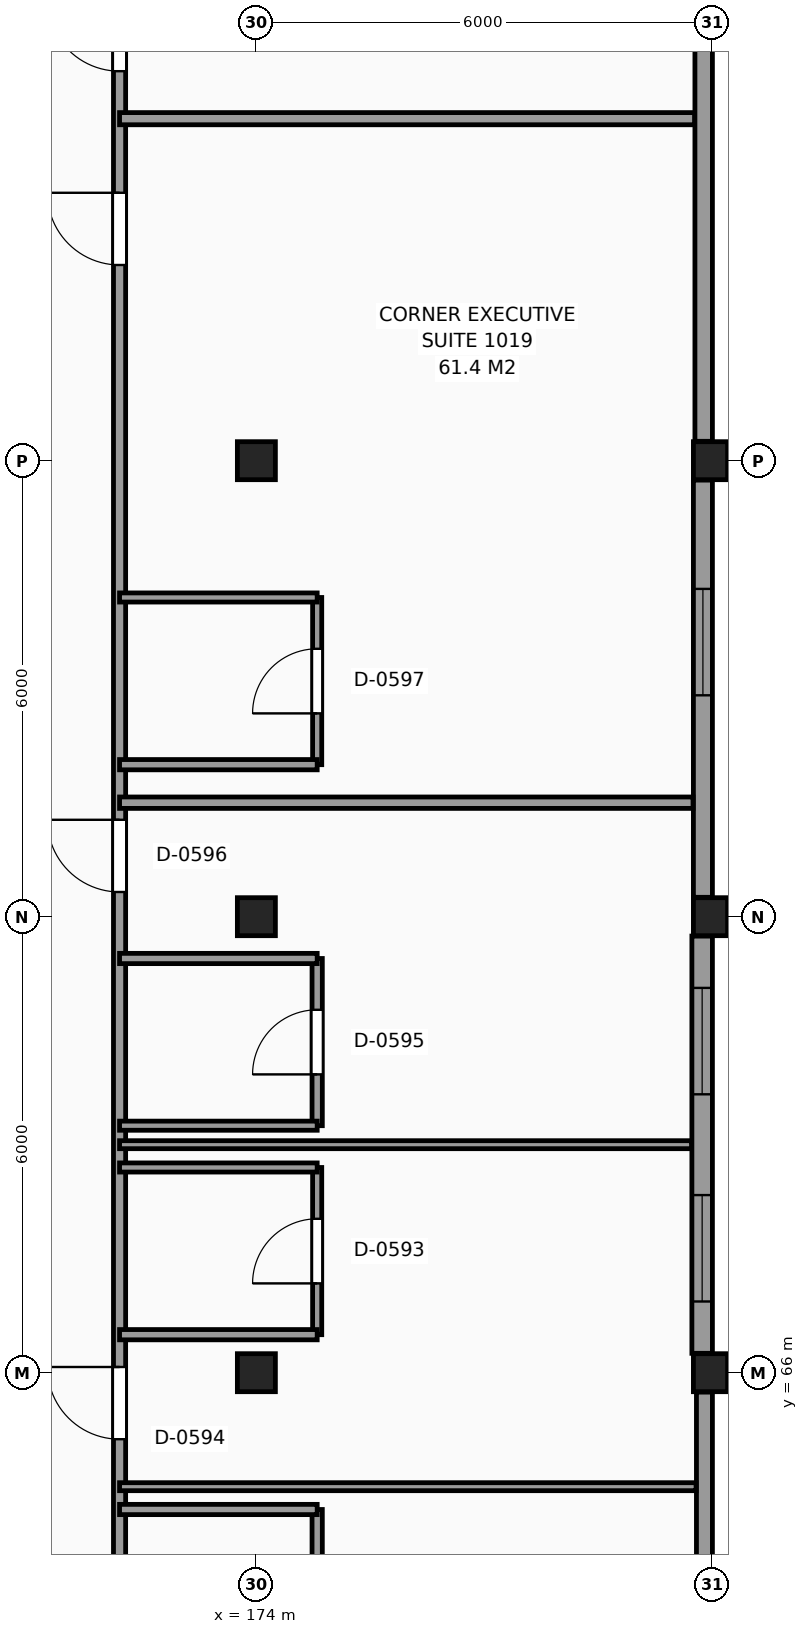
"""IFC4 building model, lengths in metres.
Left out: names, types, materials, properties, quantities, classifications, styles, units other than length and angle.
Written with IfcOpenShell. Run it as: python <this file> out.ifc"""

import sys

from ifc_helpers import new_model, si_unit, direction, frame, frame_2d, origin, origin_2d, place, context, subcontext, project, spatial, rectangle, extrude, element, fill, save


model = new_model("IFC4")
c1 = context("Model", 3, precision=1e-05, world=origin(), true_north=direction((0.0, 1.0)))
c2 = subcontext(c1, "Body", "Model", "MODEL_VIEW")
j1 = project(units=[si_unit("LENGTHUNIT", "METRE"), si_unit("PLANEANGLEUNIT", "RADIAN")], contexts=[c1])
p1 = place(None, origin())
s1 = spatial("IfcSite", under=j1, at=p1, CompositionType="ELEMENT")
p2 = place(p1, origin())
s2 = spatial("IfcBuilding", under=s1, at=p2, CompositionType="ELEMENT")
p3 = place(p2, frame((0.0, 0.0, 41.4)))
s3 = spatial("IfcBuildingStorey", under=s2, at=p3, CompositionType="ELEMENT", Elevation=41.4)
for number, where, z_axis, x_axis in (
    (1, (174.0, 66.0, 0.0), (0.0, 0.0, 1.0), (1.0, 0.0, 0.0)),
    (2, (174.0, 72.0, 0.0), (0.0, 0.0, 1.0), (1.0, 0.0, 0.0)),
    (3, (174.0, 78.0, 0.0), (0.0, 0.0, 1.0), (1.0, 0.0, 0.0)),
    (4, (180.0, 66.0, 0.0), (0.0, 0.0, 1.0), (1.0, 0.0, 0.0)),
    (5, (180.0, 72.0, 0.0), (0.0, 0.0, 1.0), (1.0, 0.0, 0.0)),
    (6, (180.0, 78.0, 0.0), (0.0, 0.0, 1.0), (1.0, 0.0, 0.0)),
):
    element("IfcColumn", number, at=place(p3, frame(where, z_axis=z_axis, x_axis=x_axis)), inside=s3, PredefinedType="COLUMN", context=c2, shape_type="SweptSolid", body=[
        extrude(rectangle(XDim=0.5, YDim=0.5, at=origin_2d()), origin(), (0.0, 0.0, 1.0), 3.3),
    ])
p4 = place(p3, frame((179.895, 60.255, 0.0), z_axis=(0.0, 0.0, 1.0), x_axis=(0.0, 1.0, 0.0)))
e7 = element("IfcWall", 7, at=p4, inside=s3, PredefinedType="SOLIDWALL", context=c2, shape_type="SweptSolid", body=[
    extrude(rectangle(XDim=5.49, YDim=0.21, at=frame_2d((2.745, 0.0))), origin(), (0.0, 0.0, 1.0), 2.445),
])
p5 = place(p4, frame((1.433, 0.0, 0.8)))
e8 = element("IfcOpeningElement", 8, at=p5, cuts=e7, PredefinedType="OPENING", context=c2, shape_type="SweptSolid", body=[
    extrude(rectangle(XDim=1.4, YDim=1.4, at=frame_2d((0.7, 0.7))), frame((0.0, 0.115, 0.0), z_axis=(0.0, -1.0, 0.0), x_axis=(1.0, 0.0, 0.0)), (0.0, 0.0, 1.0), 0.23),
])
p6 = place(p3, frame((179.865, 66.255, 0.0), z_axis=(0.0, 0.0, 1.0), x_axis=(0.0, 1.0, 0.0)))
e9 = element("IfcWall", 9, at=p6, inside=s3, PredefinedType="SOLIDWALL", context=c2, shape_type="SweptSolid", body=[
    extrude(rectangle(XDim=5.49, YDim=0.27, at=frame_2d((2.745, 0.0))), origin(), (0.0, 0.0, 1.0), 2.41),
])
p7 = place(p6, frame((0.682, 0.0, 0.8)))
e10 = element("IfcOpeningElement", 10, at=p7, cuts=e9, PredefinedType="OPENING", context=c2, shape_type="SweptSolid", body=[
    extrude(rectangle(XDim=1.4, YDim=1.4, at=frame_2d((0.7, 0.7))), frame((0.0, 0.145, 0.0), z_axis=(0.0, -1.0, 0.0), x_axis=(1.0, 0.0, 0.0)), (0.0, 0.0, 1.0), 0.29),
])
p8 = place(p6, frame((3.408, 0.0, 0.8)))
e11 = element("IfcOpeningElement", 11, at=p8, cuts=e9, PredefinedType="OPENING", context=c2, shape_type="SweptSolid", body=[
    extrude(rectangle(XDim=1.4, YDim=1.4, at=frame_2d((0.7, 0.7))), frame((0.0, 0.145, 0.0), z_axis=(0.0, -1.0, 0.0), x_axis=(1.0, 0.0, 0.0)), (0.0, 0.0, 1.0), 0.29),
])
p9 = place(p3, frame((179.875, 72.255, 0.0), z_axis=(0.0, 0.0, 1.0), x_axis=(0.0, 1.0, 0.0)))
e12 = element("IfcWall", 12, at=p9, inside=s3, PredefinedType="SOLIDWALL", context=c2, shape_type="SweptSolid", body=[
    extrude(rectangle(XDim=5.49, YDim=0.25, at=frame_2d((2.745, 0.0))), origin(), (0.0, 0.0, 1.0), 2.41),
])
p10 = place(p9, frame((2.658, 0.0, 0.8)))
e13 = element("IfcOpeningElement", 13, at=p10, cuts=e12, PredefinedType="OPENING", context=c2, shape_type="SweptSolid", body=[
    extrude(rectangle(XDim=1.4, YDim=1.4, at=frame_2d((0.7, 0.7))), frame((0.0, 0.135, 0.0), z_axis=(0.0, -1.0, 0.0), x_axis=(1.0, 0.0, 0.0)), (0.0, 0.0, 1.0), 0.27),
])
p11 = place(p3, frame((179.885, 78.255, 0.0), z_axis=(0.0, 0.0, 1.0), x_axis=(0.0, 1.0, 0.0)))
e14 = element("IfcWall", 14, at=p11, inside=s3, PredefinedType="SOLIDWALL", context=c2, shape_type="SweptSolid", body=[
    extrude(rectangle(XDim=5.49, YDim=0.23, at=frame_2d((2.745, 0.0))), origin(), (0.0, 0.0, 1.0), 2.41),
])
p12 = place(p3, frame((172.2, 42.275, 0.0), z_axis=(0.0, 0.0, 1.0), x_axis=(0.0, 1.0, 0.0)))
e15 = element("IfcWall", 15, at=p12, inside=s3, PredefinedType="PARTITIONING", context=c2, shape_type="SweptSolid", body=[
    extrude(rectangle(XDim=65.545, YDim=0.16, at=frame_2d((32.772, 0.0))), origin(), (0.0, 0.0, 1.0), 3.06),
])
p13 = place(p12, frame((0.4, 0.0, 0.0)))
e16 = element("IfcOpeningElement", 16, at=p13, cuts=e15, PredefinedType="OPENING", context=c2, shape_type="SweptSolid", body=[
    extrude(rectangle(XDim=0.95, YDim=2.1, at=frame_2d((0.475, 1.05))), frame((0.0, 0.09, 0.0), z_axis=(0.0, -1.0, 0.0), x_axis=(1.0, 0.0, 0.0)), (0.0, 0.0, 1.0), 0.18),
])
p14 = place(p12, frame((4.85, 0.0, 0.0)))
e17 = element("IfcOpeningElement", 17, at=p14, cuts=e15, PredefinedType="OPENING", context=c2, shape_type="SweptSolid", body=[
    extrude(rectangle(XDim=0.95, YDim=2.1, at=frame_2d((0.475, 1.05))), frame((0.0, 0.09, 0.0), z_axis=(0.0, -1.0, 0.0), x_axis=(1.0, 0.0, 0.0)), (0.0, 0.0, 1.0), 0.18),
])
p15 = place(p12, frame((9.35, 0.0, 0.0)))
e18 = element("IfcOpeningElement", 18, at=p15, cuts=e15, PredefinedType="OPENING", context=c2, shape_type="SweptSolid", body=[
    extrude(rectangle(XDim=0.95, YDim=2.1, at=frame_2d((0.475, 1.05))), frame((0.0, 0.09, 0.0), z_axis=(0.0, -1.0, 0.0), x_axis=(1.0, 0.0, 0.0)), (0.0, 0.0, 1.0), 0.18),
])
p16 = place(p12, frame((18.45, 0.0, 0.0)))
e19 = element("IfcOpeningElement", 19, at=p16, cuts=e15, PredefinedType="OPENING", context=c2, shape_type="SweptSolid", body=[
    extrude(rectangle(XDim=0.95, YDim=2.1, at=frame_2d((0.475, 1.05))), frame((0.0, 0.09, 0.0), z_axis=(0.0, -1.0, 0.0), x_axis=(1.0, 0.0, 0.0)), (0.0, 0.0, 1.0), 0.18),
])
p17 = place(p12, frame((22.85, 0.0, 0.0)))
e20 = element("IfcOpeningElement", 20, at=p17, cuts=e15, PredefinedType="OPENING", context=c2, shape_type="SweptSolid", body=[
    extrude(rectangle(XDim=0.95, YDim=2.1, at=frame_2d((0.475, 1.05))), frame((0.0, 0.09, 0.0), z_axis=(0.0, -1.0, 0.0), x_axis=(1.0, 0.0, 0.0)), (0.0, 0.0, 1.0), 0.18),
])
p18 = place(p12, frame((30.05, 0.0, 0.0)))
e21 = element("IfcOpeningElement", 21, at=p18, cuts=e15, PredefinedType="OPENING", context=c2, shape_type="SweptSolid", body=[
    extrude(rectangle(XDim=0.95, YDim=2.1, at=frame_2d((0.475, 1.05))), frame((0.0, 0.09, 0.0), z_axis=(0.0, -1.0, 0.0), x_axis=(1.0, 0.0, 0.0)), (0.0, 0.0, 1.0), 0.18),
])
p19 = place(p12, frame((38.3, 0.0, 0.0)))
e22 = element("IfcOpeningElement", 22, at=p19, cuts=e15, PredefinedType="OPENING", context=c2, shape_type="SweptSolid", body=[
    extrude(rectangle(XDim=0.95, YDim=2.1, at=frame_2d((0.475, 1.05))), frame((0.0, 0.09, 0.0), z_axis=(0.0, -1.0, 0.0), x_axis=(1.0, 0.0, 0.0)), (0.0, 0.0, 1.0), 0.18),
])
p20 = place(p12, frame((40.85, 0.0, 0.0)))
e23 = element("IfcOpeningElement", 23, at=p20, cuts=e15, PredefinedType="OPENING", context=c2, shape_type="SweptSolid", body=[
    extrude(rectangle(XDim=0.95, YDim=2.1, at=frame_2d((0.475, 1.05))), frame((0.0, 0.09, 0.0), z_axis=(0.0, -1.0, 0.0), x_axis=(1.0, 0.0, 0.0)), (0.0, 0.0, 1.0), 0.18),
])
p21 = place(p12, frame((48.05, 0.0, 0.0)))
e24 = element("IfcOpeningElement", 24, at=p21, cuts=e15, PredefinedType="OPENING", context=c2, shape_type="SweptSolid", body=[
    extrude(rectangle(XDim=0.95, YDim=2.1, at=frame_2d((0.475, 1.05))), frame((0.0, 0.09, 0.0), z_axis=(0.0, -1.0, 0.0), x_axis=(1.0, 0.0, 0.0)), (0.0, 0.0, 1.0), 0.18),
])
p22 = place(p12, frame((52.25, 0.0, 0.0)))
e25 = element("IfcOpeningElement", 25, at=p22, cuts=e15, PredefinedType="OPENING", context=c2, shape_type="SweptSolid", body=[
    extrude(rectangle(XDim=0.95, YDim=2.1, at=frame_2d((0.475, 1.05))), frame((0.0, 0.09, 0.0), z_axis=(0.0, -1.0, 0.0), x_axis=(1.0, 0.0, 0.0)), (0.0, 0.0, 1.0), 0.18),
])
p23 = place(p12, frame((54.45, 0.0, 0.0)))
e26 = element("IfcOpeningElement", 26, at=p23, cuts=e15, PredefinedType="OPENING", context=c2, shape_type="SweptSolid", body=[
    extrude(rectangle(XDim=0.95, YDim=2.1, at=frame_2d((0.475, 1.05))), frame((0.0, 0.09, 0.0), z_axis=(0.0, -1.0, 0.0), x_axis=(1.0, 0.0, 0.0)), (0.0, 0.0, 1.0), 0.18),
])
p24 = place(p12, frame((60.45, 0.0, 0.0)))
e27 = element("IfcOpeningElement", 27, at=p24, cuts=e15, PredefinedType="OPENING", context=c2, shape_type="SweptSolid", body=[
    extrude(rectangle(XDim=0.95, YDim=2.1, at=frame_2d((0.475, 1.05))), frame((0.0, 0.09, 0.0), z_axis=(0.0, -1.0, 0.0), x_axis=(1.0, 0.0, 0.0)), (0.0, 0.0, 1.0), 0.18),
])
p25 = place(p3, frame((174.8, 62.0, 0.0), z_axis=(0.0, 0.0, 1.0), x_axis=(0.0, 1.0, 0.0)))
e28 = element("IfcWall", 28, at=p25, inside=s3, PredefinedType="PARTITIONING", context=c2, shape_type="SweptSolid", body=[
    extrude(rectangle(XDim=2.2, YDim=0.135, at=frame_2d((1.1, 0.0))), origin(), (0.0, 0.0, 1.0), 3.06),
])
p26 = place(p25, frame((0.675, 0.0, 0.0)))
e29 = element("IfcOpeningElement", 29, at=p26, cuts=e28, PredefinedType="OPENING", context=c2, shape_type="SweptSolid", body=[
    extrude(rectangle(XDim=0.85, YDim=2.1, at=frame_2d((0.425, 1.05))), frame((0.0, 0.078, 0.0), z_axis=(0.0, -1.0, 0.0), x_axis=(1.0, 0.0, 0.0)), (0.0, 0.0, 1.0), 0.155),
])
p27 = place(p3, frame((174.8, 66.5, 0.0), z_axis=(0.0, 0.0, 1.0), x_axis=(0.0, 1.0, 0.0)))
e30 = element("IfcWall", 30, at=p27, inside=s3, PredefinedType="PARTITIONING", context=c2, shape_type="SweptSolid", body=[
    extrude(rectangle(XDim=2.2, YDim=0.12, at=frame_2d((1.1, 0.0))), origin(), (0.0, 0.0, 1.0), 3.06),
])
p28 = place(p27, frame((0.675, 0.0, 0.0)))
e31 = element("IfcOpeningElement", 31, at=p28, cuts=e30, PredefinedType="OPENING", context=c2, shape_type="SweptSolid", body=[
    extrude(rectangle(XDim=0.85, YDim=2.1, at=frame_2d((0.425, 1.05))), frame((0.0, 0.07, 0.0), z_axis=(0.0, -1.0, 0.0), x_axis=(1.0, 0.0, 0.0)), (0.0, 0.0, 1.0), 0.14),
])
p29 = place(p3, frame((174.8, 69.25, 0.0), z_axis=(0.0, 0.0, 1.0), x_axis=(0.0, 1.0, 0.0)))
e32 = element("IfcWall", 32, at=p29, inside=s3, PredefinedType="PARTITIONING", context=c2, shape_type="SweptSolid", body=[
    extrude(rectangle(XDim=2.2, YDim=0.135, at=frame_2d((1.1, 0.0))), origin(), (0.0, 0.0, 1.0), 3.06),
])
p30 = place(p29, frame((0.675, 0.0, 0.0)))
e33 = element("IfcOpeningElement", 33, at=p30, cuts=e32, PredefinedType="OPENING", context=c2, shape_type="SweptSolid", body=[
    extrude(rectangle(XDim=0.85, YDim=2.1, at=frame_2d((0.425, 1.05))), frame((0.0, 0.078, 0.0), z_axis=(0.0, -1.0, 0.0), x_axis=(1.0, 0.0, 0.0)), (0.0, 0.0, 1.0), 0.155),
])
p31 = place(p3, frame((174.8, 74.0, 0.0), z_axis=(0.0, 0.0, 1.0), x_axis=(0.0, 1.0, 0.0)))
e34 = element("IfcWall", 34, at=p31, inside=s3, PredefinedType="PARTITIONING", context=c2, shape_type="SweptSolid", body=[
    extrude(rectangle(XDim=2.2, YDim=0.12, at=frame_2d((1.1, 0.0))), origin(), (0.0, 0.0, 1.0), 3.06),
])
p32 = place(p31, frame((0.675, 0.0, 0.0)))
e35 = element("IfcOpeningElement", 35, at=p32, cuts=e34, PredefinedType="OPENING", context=c2, shape_type="SweptSolid", body=[
    extrude(rectangle(XDim=0.85, YDim=2.1, at=frame_2d((0.425, 1.05))), frame((0.0, 0.07, 0.0), z_axis=(0.0, -1.0, 0.0), x_axis=(1.0, 0.0, 0.0)), (0.0, 0.0, 1.0), 0.14),
])
p33 = place(p3, frame((172.2, 64.2, 0.0), z_axis=(0.0, 0.0, 1.0), x_axis=(1.0, 0.0, 0.0)))
e36 = element("IfcWall", 36, at=p33, inside=s3, PredefinedType="PARTITIONING", context=c2, shape_type="SweptSolid", body=[
    extrude(rectangle(XDim=2.6, YDim=0.135, at=frame_2d((1.3, 0.0))), origin(), (0.0, 0.0, 1.0), 3.06),
])
p34 = place(p3, frame((172.2, 64.5, 0.0), z_axis=(0.0, 0.0, 1.0), x_axis=(1.0, 0.0, 0.0)))
e37 = element("IfcWall", 37, at=p34, inside=s3, PredefinedType="PARTITIONING", context=c2, shape_type="SweptSolid", body=[
    extrude(rectangle(XDim=7.585, YDim=0.105, at=frame_2d((3.792, 0.0))), origin(), (0.0, 0.0, 1.0), 3.06),
])
p35 = place(p3, frame((172.2, 66.5, 0.0), z_axis=(0.0, 0.0, 1.0), x_axis=(1.0, 0.0, 0.0)))
e38 = element("IfcWall", 38, at=p35, inside=s3, PredefinedType="PARTITIONING", context=c2, shape_type="SweptSolid", body=[
    extrude(rectangle(XDim=2.6, YDim=0.135, at=frame_2d((1.3, 0.0))), origin(), (0.0, 0.0, 1.0), 3.06),
])
p36 = place(p3, frame((172.2, 68.7, 0.0), z_axis=(0.0, 0.0, 1.0), x_axis=(1.0, 0.0, 0.0)))
e39 = element("IfcWall", 39, at=p36, inside=s3, PredefinedType="PARTITIONING", context=c2, shape_type="SweptSolid", body=[
    extrude(rectangle(XDim=2.6, YDim=0.12, at=frame_2d((1.3, 0.0))), origin(), (0.0, 0.0, 1.0), 3.06),
])
p37 = place(p3, frame((172.2, 69.0, 0.0), z_axis=(0.0, 0.0, 1.0), x_axis=(1.0, 0.0, 0.0)))
e40 = element("IfcWall", 40, at=p37, inside=s3, PredefinedType="PARTITIONING", context=c2, shape_type="SweptSolid", body=[
    extrude(rectangle(XDim=7.525, YDim=0.105, at=frame_2d((3.763, 0.0))), origin(), (0.0, 0.0, 1.0), 3.06),
])
p38 = place(p3, frame((172.2, 69.25, 0.0), z_axis=(0.0, 0.0, 1.0), x_axis=(1.0, 0.0, 0.0)))
e41 = element("IfcWall", 41, at=p38, inside=s3, PredefinedType="PARTITIONING", context=c2, shape_type="SweptSolid", body=[
    extrude(rectangle(XDim=2.6, YDim=0.12, at=frame_2d((1.3, 0.0))), origin(), (0.0, 0.0, 1.0), 3.06),
])
p39 = place(p3, frame((172.2, 71.45, 0.0), z_axis=(0.0, 0.0, 1.0), x_axis=(1.0, 0.0, 0.0)))
e42 = element("IfcWall", 42, at=p39, inside=s3, PredefinedType="PARTITIONING", context=c2, shape_type="SweptSolid", body=[
    extrude(rectangle(XDim=2.6, YDim=0.135, at=frame_2d((1.3, 0.0))), origin(), (0.0, 0.0, 1.0), 3.06),
])
p40 = place(p3, frame((172.2, 73.5, 0.0), z_axis=(0.0, 0.0, 1.0), x_axis=(1.0, 0.0, 0.0)))
e43 = element("IfcWall", 43, at=p40, inside=s3, PredefinedType="PARTITIONING", context=c2, shape_type="SweptSolid", body=[
    extrude(rectangle(XDim=7.545, YDim=0.15, at=frame_2d((3.772, 0.0))), origin(), (0.0, 0.0, 1.0), 3.06),
])
p41 = place(p3, frame((172.2, 74.0, 0.0), z_axis=(0.0, 0.0, 1.0), x_axis=(1.0, 0.0, 0.0)))
e44 = element("IfcWall", 44, at=p41, inside=s3, PredefinedType="PARTITIONING", context=c2, shape_type="SweptSolid", body=[
    extrude(rectangle(XDim=2.6, YDim=0.135, at=frame_2d((1.3, 0.0))), origin(), (0.0, 0.0, 1.0), 3.06),
])
p42 = place(p3, frame((172.2, 76.2, 0.0), z_axis=(0.0, 0.0, 1.0), x_axis=(1.0, 0.0, 0.0)))
e45 = element("IfcWall", 45, at=p42, inside=s3, PredefinedType="PARTITIONING", context=c2, shape_type="SweptSolid", body=[
    extrude(rectangle(XDim=2.6, YDim=0.12, at=frame_2d((1.3, 0.0))), origin(), (0.0, 0.0, 1.0), 3.06),
])
p43 = place(p3, frame((172.2, 82.5, 0.0), z_axis=(0.0, 0.0, 1.0), x_axis=(1.0, 0.0, 0.0)))
e46 = element("IfcWall", 46, at=p43, inside=s3, PredefinedType="PARTITIONING", context=c2, shape_type="SweptSolid", body=[
    extrude(rectangle(XDim=7.565, YDim=0.16, at=frame_2d((3.782, 0.0))), origin(), (0.0, 0.0, 1.0), 3.06),
])
p44 = place(p7, origin())
e47 = element("IfcWindow", 47, at=p44, inside=s3, PartitioningType="SINGLE_PANEL", PredefinedType="WINDOW", context=c2, shape_type="SweptSolid", body=[
    extrude(rectangle(XDim=1.4, YDim=1.4, at=frame_2d((0.7, 0.7))), frame((0.0, 0.03, 0.0), z_axis=(0.0, -1.0, 0.0), x_axis=(1.0, 0.0, 0.0)), (0.0, 0.0, 1.0), 0.06),
])
fill(e10, e47)
p45 = place(p8, origin())
e48 = element("IfcWindow", 48, at=p45, inside=s3, PartitioningType="SINGLE_PANEL", PredefinedType="WINDOW", context=c2, shape_type="SweptSolid", body=[
    extrude(rectangle(XDim=1.4, YDim=1.4, at=frame_2d((0.7, 0.7))), frame((0.0, 0.03, 0.0), z_axis=(0.0, -1.0, 0.0), x_axis=(1.0, 0.0, 0.0)), (0.0, 0.0, 1.0), 0.06),
])
fill(e11, e48)
p46 = place(p10, origin())
e49 = element("IfcWindow", 49, at=p46, inside=s3, PartitioningType="SINGLE_PANEL", PredefinedType="WINDOW", context=c2, shape_type="SweptSolid", body=[
    extrude(rectangle(XDim=1.4, YDim=1.4, at=frame_2d((0.7, 0.7))), frame((0.0, 0.03, 0.0), z_axis=(0.0, -1.0, 0.0), x_axis=(1.0, 0.0, 0.0)), (0.0, 0.0, 1.0), 0.06),
])
fill(e13, e49)
p47 = place(p28, origin())
e50 = element("IfcDoor", 50, at=p47, inside=s3, OperationType="SINGLE_SWING_LEFT", PredefinedType="DOOR", context=c2, shape_type="SweptSolid", body=[
    extrude(rectangle(XDim=0.85, YDim=2.1, at=frame_2d((0.425, 1.05))), frame((0.0, 0.025, 0.0), z_axis=(0.0, -1.0, 0.0), x_axis=(1.0, 0.0, 0.0)), (0.0, 0.0, 1.0), 0.05),
])
fill(e31, e50)
p48 = place(p17, origin())
e51 = element("IfcDoor", 51, at=p48, inside=s3, OperationType="SINGLE_SWING_RIGHT", PredefinedType="DOOR", context=c2, shape_type="SweptSolid", body=[
    extrude(rectangle(XDim=0.95, YDim=2.1, at=frame_2d((0.475, 1.05))), frame((0.0, 0.025, 0.0), z_axis=(0.0, -1.0, 0.0), x_axis=(1.0, 0.0, 0.0)), (0.0, 0.0, 1.0), 0.05),
])
fill(e20, e51)
p49 = place(p30, origin())
e52 = element("IfcDoor", 52, at=p49, inside=s3, OperationType="SINGLE_SWING_LEFT", PredefinedType="DOOR", context=c2, shape_type="SweptSolid", body=[
    extrude(rectangle(XDim=0.85, YDim=2.1, at=frame_2d((0.425, 1.05))), frame((0.0, 0.025, 0.0), z_axis=(0.0, -1.0, 0.0), x_axis=(1.0, 0.0, 0.0)), (0.0, 0.0, 1.0), 0.05),
])
fill(e33, e52)
p50 = place(p18, origin())
e53 = element("IfcDoor", 53, at=p50, inside=s3, OperationType="SINGLE_SWING_RIGHT", PredefinedType="DOOR", context=c2, shape_type="SweptSolid", body=[
    extrude(rectangle(XDim=0.95, YDim=2.1, at=frame_2d((0.475, 1.05))), frame((0.0, 0.025, 0.0), z_axis=(0.0, -1.0, 0.0), x_axis=(1.0, 0.0, 0.0)), (0.0, 0.0, 1.0), 0.05),
])
fill(e21, e53)
p51 = place(p32, origin())
e54 = element("IfcDoor", 54, at=p51, inside=s3, OperationType="SINGLE_SWING_LEFT", PredefinedType="DOOR", context=c2, shape_type="SweptSolid", body=[
    extrude(rectangle(XDim=0.85, YDim=2.1, at=frame_2d((0.425, 1.05))), frame((0.0, 0.025, 0.0), z_axis=(0.0, -1.0, 0.0), x_axis=(1.0, 0.0, 0.0)), (0.0, 0.0, 1.0), 0.05),
])
fill(e35, e54)
p52 = place(p19, origin())
e55 = element("IfcDoor", 55, at=p52, inside=s3, OperationType="SINGLE_SWING_RIGHT", PredefinedType="DOOR", context=c2, shape_type="SweptSolid", body=[
    extrude(rectangle(XDim=0.95, YDim=2.1, at=frame_2d((0.475, 1.05))), frame((0.0, 0.025, 0.0), z_axis=(0.0, -1.0, 0.0), x_axis=(1.0, 0.0, 0.0)), (0.0, 0.0, 1.0), 0.05),
])
fill(e22, e55)
p53 = place(p20, origin())
e56 = element("IfcDoor", 56, at=p53, inside=s3, OperationType="SINGLE_SWING_RIGHT", PredefinedType="DOOR", context=c2, shape_type="SweptSolid", body=[
    extrude(rectangle(XDim=0.95, YDim=2.1, at=frame_2d((0.475, 1.05))), frame((0.0, 0.025, 0.0), z_axis=(0.0, -1.0, 0.0), x_axis=(1.0, 0.0, 0.0)), (0.0, 0.0, 1.0), 0.05),
])
fill(e23, e56)
save(model, sys.argv[1])
